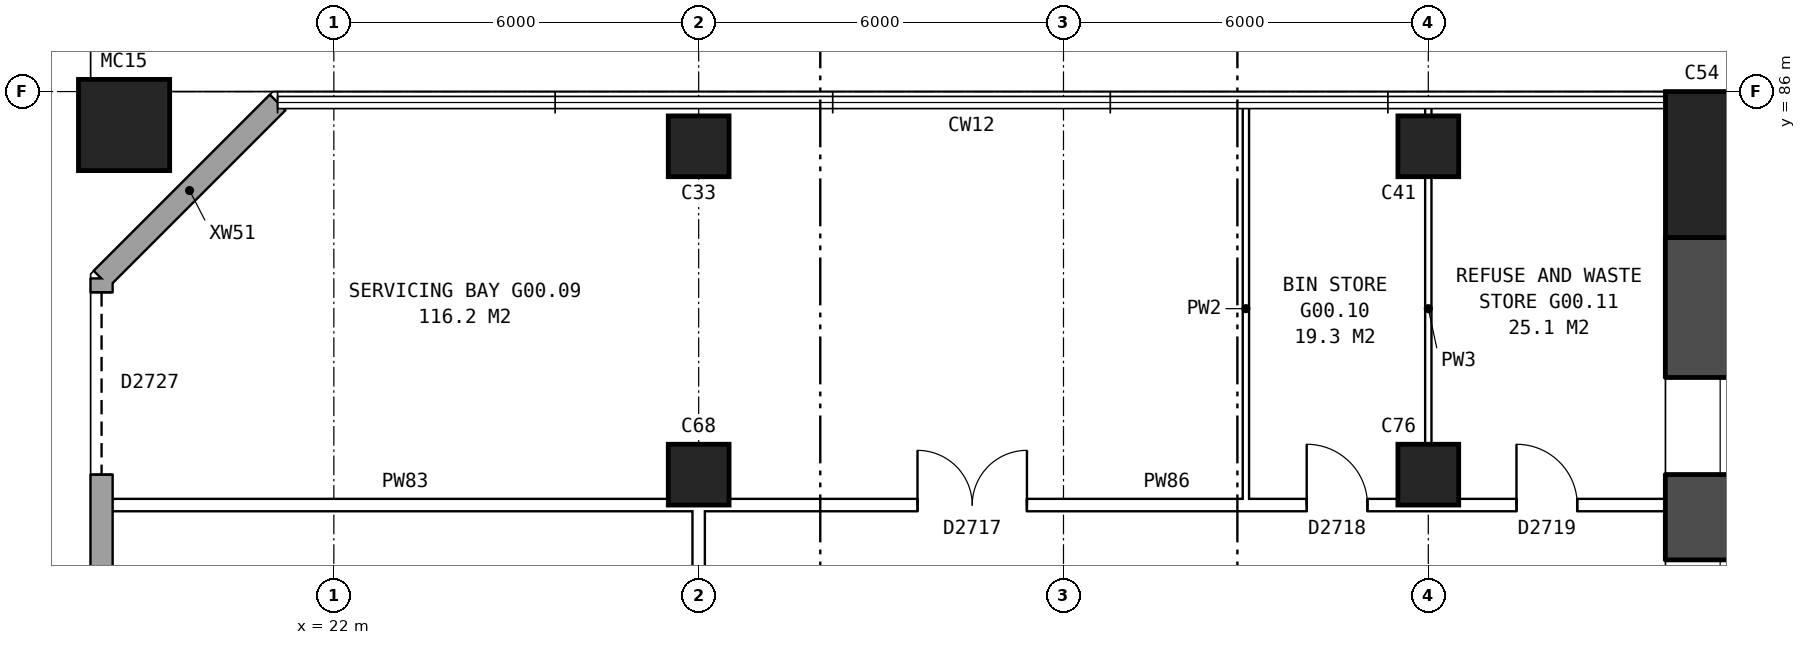
"""IFC4 building model, lengths in metres.
Left out: names, types, materials, properties, quantities, classifications, styles, units other than length and angle.
Written with IfcOpenShell. Run it as: python <this file> out.ifc"""

import sys

from ifc_helpers import new_model, si_unit, direction, frame, frame_2d, origin, origin_2d, place, context, subcontext, project, spatial, rectangle, hollow_rectangle, extrude, element, fill, save


model = new_model("IFC4")
c1 = context("Model", 3, precision=1e-05, world=origin(), true_north=direction((0.0, 1.0)))
c2 = subcontext(c1, "Body", "Model", "MODEL_VIEW")
j1 = project(units=[si_unit("LENGTHUNIT", "METRE"), si_unit("PLANEANGLEUNIT", "RADIAN")], contexts=[c1])
p1 = place(None, origin())
s1 = spatial("IfcSite", under=j1, at=p1, CompositionType="ELEMENT")
p2 = place(p1, origin())
s2 = spatial("IfcBuilding", under=s1, at=p2, CompositionType="ELEMENT")
p3 = place(p2, origin())
s3 = spatial("IfcBuildingStorey", under=s2, at=p3, CompositionType="ELEMENT", Elevation=0.0)
p4 = place(p3, frame((44.5, 84.8, -0.35), z_axis=(0.0, 0.0, 1.0), x_axis=(1.0, 0.0, 0.0)))
e1 = element("IfcColumn", 1, at=p4, inside=s3, PredefinedType="COLUMN", context=c2, shape_type="SweptSolid", body=[
    extrude(rectangle(XDim=1.2, YDim=2.4, at=origin_2d()), origin(), (0.0, 0.0, 1.0), 5.55),
])
p5 = place(p3, frame((44.5, 56.4, -0.35), z_axis=(0.0, 0.0, 1.0), x_axis=(0.0, 1.0, 0.0)))
e2 = element("IfcWall", 2, at=p5, inside=s3, PredefinedType="SHEAR", context=c2, shape_type="SweptSolid", body=[
    extrude(rectangle(XDim=27.2, YDim=1.2, at=frame_2d((13.6, 0.0))), origin(), (0.0, 0.0, 1.0), 5.55),
])
p6 = place(p5, frame((2.3, 0.0, 0.8)))
e3 = element("IfcOpeningElement", 3, at=p6, cuts=e2, PredefinedType="OPENING", context=c2, shape_type="SweptSolid", body=[
    extrude(rectangle(XDim=1.6, YDim=1.8, at=frame_2d((0.8, 0.9))), frame((0.0, 0.61, 0.0), z_axis=(0.0, -1.0, 0.0), x_axis=(1.0, 0.0, 0.0)), (0.0, 0.0, 1.0), 1.22),
])
p7 = place(p5, frame((5.3, 0.0, 0.8)))
e4 = element("IfcOpeningElement", 4, at=p7, cuts=e2, PredefinedType="OPENING", context=c2, shape_type="SweptSolid", body=[
    extrude(rectangle(XDim=1.6, YDim=1.8, at=frame_2d((0.8, 0.9))), frame((0.0, 0.61, 0.0), z_axis=(0.0, -1.0, 0.0), x_axis=(1.0, 0.0, 0.0)), (0.0, 0.0, 1.0), 1.22),
])
p8 = place(p5, frame((8.3, 0.0, 0.8)))
e5 = element("IfcOpeningElement", 5, at=p8, cuts=e2, PredefinedType="OPENING", context=c2, shape_type="SweptSolid", body=[
    extrude(rectangle(XDim=1.6, YDim=1.8, at=frame_2d((0.8, 0.9))), frame((0.0, 0.61, 0.0), z_axis=(0.0, -1.0, 0.0), x_axis=(1.0, 0.0, 0.0)), (0.0, 0.0, 1.0), 1.22),
])
p9 = place(p5, frame((11.3, 0.0, 0.8)))
e6 = element("IfcOpeningElement", 6, at=p9, cuts=e2, PredefinedType="OPENING", context=c2, shape_type="SweptSolid", body=[
    extrude(rectangle(XDim=1.6, YDim=1.8, at=frame_2d((0.8, 0.9))), frame((0.0, 0.61, 0.0), z_axis=(0.0, -1.0, 0.0), x_axis=(1.0, 0.0, 0.0)), (0.0, 0.0, 1.0), 1.22),
])
p10 = place(p5, frame((14.3, 0.0, 0.8)))
e7 = element("IfcOpeningElement", 7, at=p10, cuts=e2, PredefinedType="OPENING", context=c2, shape_type="SweptSolid", body=[
    extrude(rectangle(XDim=1.6, YDim=1.8, at=frame_2d((0.8, 0.9))), frame((0.0, 0.61, 0.0), z_axis=(0.0, -1.0, 0.0), x_axis=(1.0, 0.0, 0.0)), (0.0, 0.0, 1.0), 1.22),
])
p11 = place(p5, frame((17.3, 0.0, 0.8)))
e8 = element("IfcOpeningElement", 8, at=p11, cuts=e2, PredefinedType="OPENING", context=c2, shape_type="SweptSolid", body=[
    extrude(rectangle(XDim=1.6, YDim=1.8, at=frame_2d((0.8, 0.9))), frame((0.0, 0.61, 0.0), z_axis=(0.0, -1.0, 0.0), x_axis=(1.0, 0.0, 0.0)), (0.0, 0.0, 1.0), 1.22),
])
p12 = place(p5, frame((20.3, 0.0, 0.8)))
e9 = element("IfcOpeningElement", 9, at=p12, cuts=e2, PredefinedType="OPENING", context=c2, shape_type="SweptSolid", body=[
    extrude(rectangle(XDim=1.6, YDim=1.8, at=frame_2d((0.8, 0.9))), frame((0.0, 0.61, 0.0), z_axis=(0.0, -1.0, 0.0), x_axis=(1.0, 0.0, 0.0)), (0.0, 0.0, 1.0), 1.22),
])
p13 = place(p5, frame((23.3, 0.0, 0.8)))
e10 = element("IfcOpeningElement", 10, at=p13, cuts=e2, PredefinedType="OPENING", context=c2, shape_type="SweptSolid", body=[
    extrude(rectangle(XDim=1.6, YDim=1.8, at=frame_2d((0.8, 0.9))), frame((0.0, 0.61, 0.0), z_axis=(0.0, -1.0, 0.0), x_axis=(1.0, 0.0, 0.0)), (0.0, 0.0, 1.0), 1.22),
])
for number, where, z_axis, x_axis in (
    (11, (28.0, 79.7, -0.35), (0.0, 0.0, 1.0), (1.0, 0.0, 0.0)),
    (12, (28.0, 85.1, -0.35), (0.0, 0.0, 1.0), (1.0, 0.0, 0.0)),
    (13, (40.0, 79.7, -0.35), (0.0, 0.0, 1.0), (1.0, 0.0, 0.0)),
    (14, (40.0, 85.1, -0.35), (0.0, 0.0, 1.0), (1.0, 0.0, 0.0)),
):
    element("IfcColumn", number, at=place(p3, frame(where, z_axis=z_axis, x_axis=x_axis)), inside=s3, PredefinedType="COLUMN", context=c2, shape_type="SweptSolid", body=[
        extrude(rectangle(XDim=1.0, YDim=1.0, at=origin_2d()), origin(), (0.0, 0.0, 1.0), 5.55),
    ])
p14 = place(p3, frame((18.55, 85.45, -0.35), z_axis=(0.0, 0.0, 1.0), x_axis=(1.0, 0.0, 0.0)))
e15 = element("IfcColumn", 15, at=p14, inside=s3, PredefinedType="COLUMN", context=c2, shape_type="SweptSolid", body=[
    extrude(hollow_rectangle(XDim=1.5, YDim=1.5, WallThickness=0.08, at=origin_2d()), origin(), (0.0, 0.0, 1.0), 5.85),
])
p15 = place(p3, frame((21.075, 85.82, 0.0), z_axis=(0.0, 0.0, 1.0), x_axis=(-0.707106781187, -0.707106781187, 0.0)))
e16 = element("IfcWall", 16, at=p15, inside=s3, PredefinedType="STANDARD", context=c2, shape_type="SweptSolid", body=[
    extrude(rectangle(XDim=4.094, YDim=0.36, at=frame_2d((2.047, 0.0))), origin(), (0.0, 0.0, 1.0), 5.2),
])
p16 = place(p3, frame((18.18, 82.925, 0.0), z_axis=(0.0, 0.0, 1.0), x_axis=(0.0, -1.0, 0.0)))
e17 = element("IfcWall", 17, at=p16, inside=s3, PredefinedType="STANDARD", context=c2, shape_type="SweptSolid", body=[
    extrude(rectangle(XDim=25.851, YDim=0.36, at=frame_2d((12.925, 0.0))), origin(), (0.0, 0.0, 1.0), 5.2),
])
p17 = place(p16, frame((16.625, 0.0, 0.8)))
e18 = element("IfcOpeningElement", 18, at=p17, cuts=e17, PredefinedType="OPENING", context=c2, shape_type="SweptSolid", body=[
    extrude(rectangle(XDim=1.6, YDim=1.8, at=frame_2d((0.8, 0.9))), frame((0.0, 0.19, 0.0), z_axis=(0.0, -1.0, 0.0), x_axis=(1.0, 0.0, 0.0)), (0.0, 0.0, 1.0), 0.38),
])
p18 = place(p16, frame((19.625, 0.0, 0.8)))
e19 = element("IfcOpeningElement", 19, at=p18, cuts=e17, PredefinedType="OPENING", context=c2, shape_type="SweptSolid", body=[
    extrude(rectangle(XDim=1.6, YDim=1.8, at=frame_2d((0.8, 0.9))), frame((0.0, 0.19, 0.0), z_axis=(0.0, -1.0, 0.0), x_axis=(1.0, 0.0, 0.0)), (0.0, 0.0, 1.0), 0.38),
])
p19 = place(p16, frame((0.225, 0.0, 0.0)))
e20 = element("IfcOpeningElement", 20, at=p19, cuts=e17, PredefinedType="OPENING", context=c2, shape_type="SweptSolid", body=[
    extrude(rectangle(XDim=3.0, YDim=4.4, at=frame_2d((1.5, 2.2))), frame((0.0, 0.19, 0.0), z_axis=(0.0, -1.0, 0.0), x_axis=(1.0, 0.0, 0.0)), (0.0, 0.0, 1.0), 0.38),
])
p20 = place(p16, frame((12.025, 0.0, 0.0)))
e21 = element("IfcOpeningElement", 21, at=p20, cuts=e17, PredefinedType="OPENING", context=c2, shape_type="SweptSolid", body=[
    extrude(rectangle(XDim=1.8, YDim=2.4, at=frame_2d((0.9, 1.2))), frame((0.0, 0.19, 0.0), z_axis=(0.0, -1.0, 0.0), x_axis=(1.0, 0.0, 0.0)), (0.0, 0.0, 1.0), 0.38),
])
p21 = place(p3, frame((18.24, 79.2, 0.0), z_axis=(0.0, 0.0, 1.0), x_axis=(1.0, 0.0, 0.0)))
e22 = element("IfcWall", 22, at=p21, inside=s3, PredefinedType="PARTITIONING", context=c2, shape_type="SweptSolid", body=[
    extrude(rectangle(XDim=9.862, YDim=0.2, at=frame_2d((4.931, 0.0))), origin(), (0.0, 0.0, 1.0), 5.2),
])
p22 = place(p3, frame((27.898, 79.2, 0.0), z_axis=(0.0, 0.0, 1.0), x_axis=(1.0, 0.0, 0.0)))
e23 = element("IfcWall", 23, at=p22, inside=s3, PredefinedType="PARTITIONING", context=c2, shape_type="SweptSolid", body=[
    extrude(rectangle(XDim=16.122, YDim=0.2, at=frame_2d((8.061, 0.0))), origin(), (0.0, 0.0, 1.0), 5.2),
])
p23 = place(p22, frame((3.701, 0.0, 0.0)))
e24 = element("IfcOpeningElement", 24, at=p23, cuts=e23, PredefinedType="OPENING", context=c2, shape_type="SweptSolid", body=[
    extrude(rectangle(XDim=1.8, YDim=2.1, at=frame_2d((0.9, 1.05))), frame((0.0, 0.11, 0.0), z_axis=(0.0, -1.0, 0.0), x_axis=(1.0, 0.0, 0.0)), (0.0, 0.0, 1.0), 0.22),
])
p24 = place(p22, frame((10.102, 0.0, 0.0)))
e25 = element("IfcOpeningElement", 25, at=p24, cuts=e23, PredefinedType="OPENING", context=c2, shape_type="SweptSolid", body=[
    extrude(rectangle(XDim=1.0, YDim=2.1, at=frame_2d((0.5, 1.05))), frame((0.0, 0.11, 0.0), z_axis=(0.0, -1.0, 0.0), x_axis=(1.0, 0.0, 0.0)), (0.0, 0.0, 1.0), 0.22),
])
p25 = place(p22, frame((13.552, 0.0, 0.0)))
e26 = element("IfcOpeningElement", 26, at=p25, cuts=e23, PredefinedType="OPENING", context=c2, shape_type="SweptSolid", body=[
    extrude(rectangle(XDim=1.0, YDim=2.1, at=frame_2d((0.5, 1.05))), frame((0.0, 0.11, 0.0), z_axis=(0.0, -1.0, 0.0), x_axis=(1.0, 0.0, 0.0)), (0.0, 0.0, 1.0), 0.22),
])
p26 = place(p3, frame((28.0, 72.9, 0.0), z_axis=(0.0, 0.0, 1.0), x_axis=(0.0, 1.0, 0.0)))
e27 = element("IfcWall", 27, at=p26, inside=s3, PredefinedType="PARTITIONING", context=c2, shape_type="SweptSolid", body=[
    extrude(rectangle(XDim=6.4, YDim=0.2, at=frame_2d((3.2, 0.0))), origin(), (0.0, 0.0, 1.0), 5.2),
])
p27 = place(p26, frame((2.7, 0.0, 0.0)))
e28 = element("IfcOpeningElement", 28, at=p27, cuts=e27, PredefinedType="OPENING", context=c2, shape_type="SweptSolid", body=[
    extrude(rectangle(XDim=1.0, YDim=2.1, at=frame_2d((0.5, 1.05))), frame((0.0, 0.11, 0.0), z_axis=(0.0, -1.0, 0.0), x_axis=(1.0, 0.0, 0.0)), (0.0, 0.0, 1.0), 0.22),
])
for number, where, z_axis, x_axis in (
    (29, (37.0, 79.1, 0.0), (0.0, 0.0, 1.0), (0.0, 1.0, 0.0)),
    (30, (40.0, 79.1, 0.0), (0.0, 0.0, 1.0), (0.0, 1.0, 0.0)),
):
    element("IfcWall", number, at=place(p3, frame(where, z_axis=z_axis, x_axis=x_axis)), inside=s3, PredefinedType="PARTITIONING", context=c2, shape_type="SweptSolid", body=[
        extrude(rectangle(XDim=6.66, YDim=0.1, at=frame_2d((3.33, 0.0))), origin(), (0.0, 0.0, 1.0), 5.2),
    ])
p28 = place(p19, frame((3.0, 0.0, 0.0), z_axis=(0.0, 0.0, 1.0), x_axis=(-1.0, 0.0, 0.0)))
e31 = element("IfcDoor", 31, at=p28, inside=s3, OperationType="ROLLINGUP", PredefinedType="GATE", context=c2, shape_type="SweptSolid", body=[
    extrude(rectangle(XDim=3.0, YDim=4.4, at=frame_2d((1.5, 2.2))), frame((0.0, 0.025, 0.0), z_axis=(0.0, -1.0, 0.0), x_axis=(1.0, 0.0, 0.0)), (0.0, 0.0, 1.0), 0.05),
])
fill(e20, e31)
p29 = place(p12, origin())
e32 = element("IfcWindow", 32, at=p29, inside=s3, PartitioningType="SINGLE_PANEL", PredefinedType="WINDOW", context=c2, shape_type="SweptSolid", body=[
    extrude(rectangle(XDim=1.6, YDim=1.8, at=frame_2d((0.8, 0.9))), frame((0.0, -0.27, 0.0), z_axis=(0.0, -1.0, 0.0), x_axis=(1.0, 0.0, 0.0)), (0.0, 0.0, 1.0), 0.06),
])
fill(e9, e32)
p30 = place(p13, origin())
e33 = element("IfcWindow", 33, at=p30, inside=s3, PartitioningType="SINGLE_PANEL", PredefinedType="WINDOW", context=c2, shape_type="SweptSolid", body=[
    extrude(rectangle(XDim=1.6, YDim=1.8, at=frame_2d((0.8, 0.9))), frame((0.0, -0.27, 0.0), z_axis=(0.0, -1.0, 0.0), x_axis=(1.0, 0.0, 0.0)), (0.0, 0.0, 1.0), 0.06),
])
fill(e10, e33)
p31 = place(p23, origin())
e34 = element("IfcDoor", 34, at=p31, inside=s3, OperationType="DOUBLE_DOOR_SINGLE_SWING", PredefinedType="DOOR", context=c2, shape_type="SweptSolid", body=[
    extrude(rectangle(XDim=1.8, YDim=2.1, at=frame_2d((0.9, 1.05))), frame((0.0, 0.025, 0.0), z_axis=(0.0, -1.0, 0.0), x_axis=(1.0, 0.0, 0.0)), (0.0, 0.0, 1.0), 0.05),
])
fill(e24, e34)
p32 = place(p24, origin())
e35 = element("IfcDoor", 35, at=p32, inside=s3, OperationType="SINGLE_SWING_LEFT", PredefinedType="DOOR", context=c2, shape_type="SweptSolid", body=[
    extrude(rectangle(XDim=1.0, YDim=2.1, at=frame_2d((0.5, 1.05))), frame((0.0, 0.025, 0.0), z_axis=(0.0, -1.0, 0.0), x_axis=(1.0, 0.0, 0.0)), (0.0, 0.0, 1.0), 0.05),
])
fill(e25, e35)
p33 = place(p25, origin())
e36 = element("IfcDoor", 36, at=p33, inside=s3, OperationType="SINGLE_SWING_LEFT", PredefinedType="DOOR", context=c2, shape_type="SweptSolid", body=[
    extrude(rectangle(XDim=1.0, YDim=2.1, at=frame_2d((0.5, 1.05))), frame((0.0, 0.025, 0.0), z_axis=(0.0, -1.0, 0.0), x_axis=(1.0, 0.0, 0.0)), (0.0, 0.0, 1.0), 0.05),
])
fill(e26, e36)
save(model, sys.argv[1])
